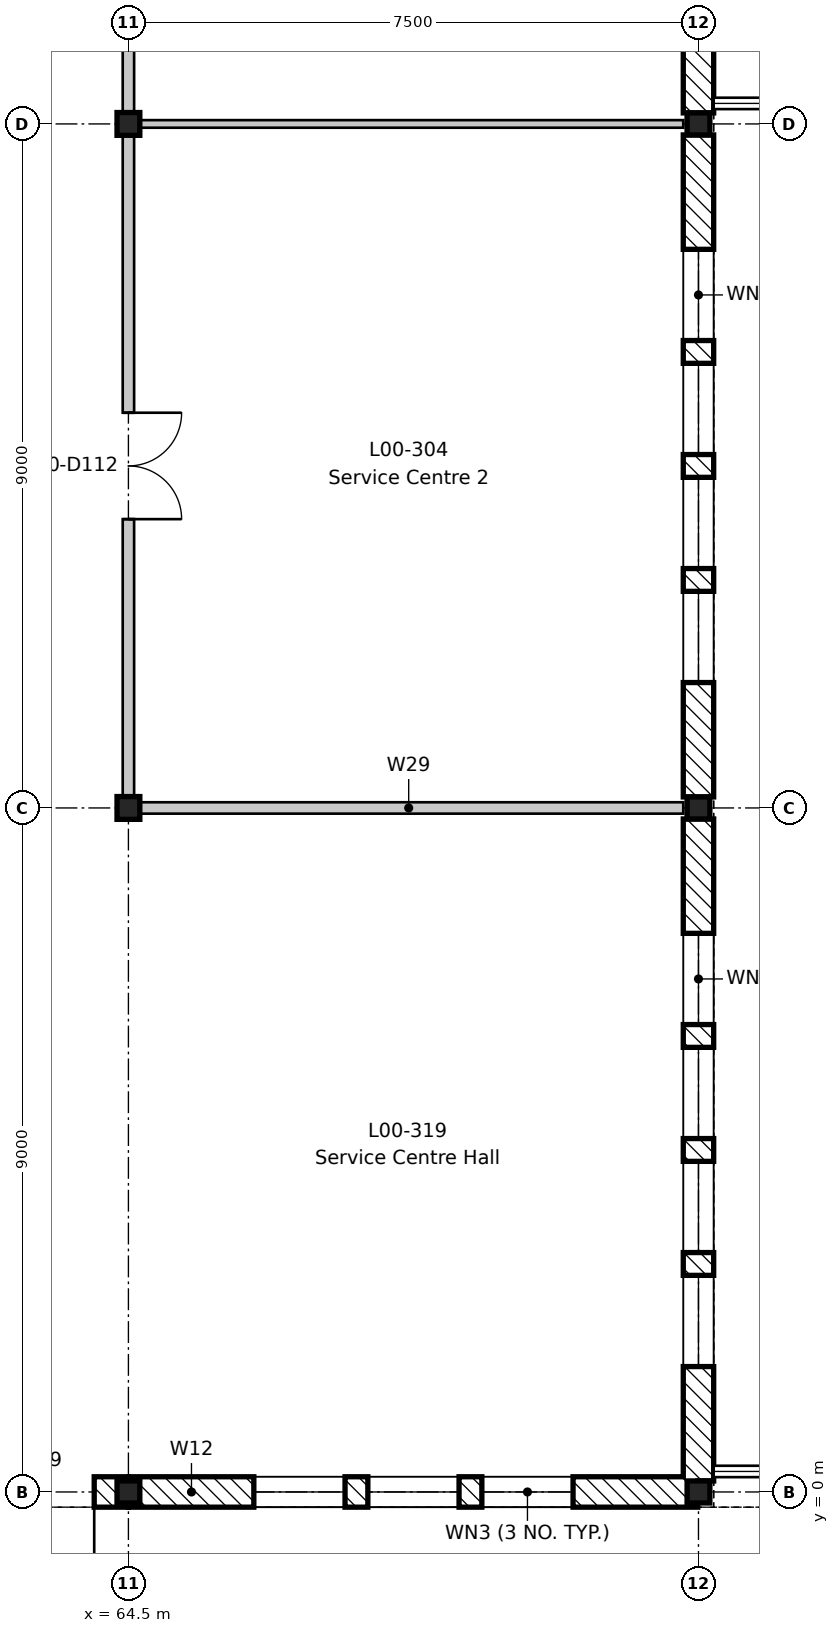
"""IFC4 building model, lengths in metres.
Left out: names, types, materials, properties, quantities, classifications, styles, units other than length and angle.
Written with IfcOpenShell. Run it as: python <this file> out.ifc"""

import sys

from ifc_helpers import new_model, si_unit, direction, frame, frame_2d, origin, origin_2d, place, context, subcontext, project, spatial, rectangle, i_section, extrude, element, fill, save


model = new_model("IFC4")
c1 = context("Model", 3, precision=1e-05, world=origin(), true_north=direction((0.0, 1.0)))
c2 = subcontext(c1, "Body", "Model", "MODEL_VIEW")
j1 = project(units=[si_unit("LENGTHUNIT", "METRE"), si_unit("PLANEANGLEUNIT", "RADIAN")], contexts=[c1])
p1 = place(None, origin())
s1 = spatial("IfcSite", under=j1, at=p1, CompositionType="ELEMENT")
p2 = place(p1, origin())
s2 = spatial("IfcBuilding", under=s1, at=p2, CompositionType="ELEMENT")
p3 = place(p2, origin())
s3 = spatial("IfcBuildingStorey", under=s2, at=p3, CompositionType="ELEMENT", Elevation=0.0)
p4 = place(p3, frame((64.5, 0.0, -0.6), z_axis=(0.0, 0.0, 1.0), x_axis=(1.0, 0.0, 0.0)))
e1 = element("IfcColumn", 1, at=p4, inside=s3, PredefinedType="COLUMN", context=c2, shape_type="SweptSolid", body=[
    extrude(i_section(OverallWidth=0.3, OverallDepth=0.29, WebThickness=0.009, FlangeThickness=0.014, FilletRadius=0.027, at=origin_2d()), origin(), (0.0, 0.0, 1.0), 5.8),
])
for number, where, z_axis, x_axis in (
    (2, (64.5, 9.0, -0.6), (0.0, 0.0, 1.0), (1.0, 0.0, 0.0)),
    (3, (64.5, 18.0, -0.6), (0.0, 0.0, 1.0), (1.0, 0.0, 0.0)),
):
    element("IfcColumn", number, at=place(p3, frame(where, z_axis=z_axis, x_axis=x_axis)), inside=s3, PredefinedType="COLUMN", context=c2, shape_type="SweptSolid", body=[
        extrude(i_section(OverallWidth=0.3, OverallDepth=0.3, WebThickness=0.011, FlangeThickness=0.019, FilletRadius=0.027, at=origin_2d()), origin(), (0.0, 0.0, 1.0), 5.8),
    ])
for number, where, z_axis, x_axis in (
    (4, (72.0, 0.0, -0.6), (0.0, 0.0, 1.0), (1.0, 0.0, 0.0)),
    (5, (72.0, 9.0, -0.6), (0.0, 0.0, 1.0), (1.0, 0.0, 0.0)),
    (6, (72.0, 18.0, -0.6), (0.0, 0.0, 1.0), (1.0, 0.0, 0.0)),
):
    element("IfcColumn", number, at=place(p3, frame(where, z_axis=z_axis, x_axis=x_axis)), inside=s3, PredefinedType="COLUMN", context=c2, shape_type="SweptSolid", body=[
        extrude(i_section(OverallWidth=0.3, OverallDepth=0.29, WebThickness=0.009, FlangeThickness=0.014, FilletRadius=0.027, at=origin_2d()), origin(), (0.0, 0.0, 1.0), 5.8),
    ])
p5 = place(p3, frame((72.0, 8.855, 0.0), z_axis=(0.0, 0.0, 1.0), x_axis=(0.0, -1.0, 0.0)))
e7 = element("IfcWall", 7, at=p5, inside=s3, PredefinedType="STANDARD", context=c2, shape_type="SweptSolid", body=[
    extrude(rectangle(XDim=8.71, YDim=0.4, at=frame_2d((4.355, 0.0))), origin(), (0.0, 0.0, 1.0), 4.8),
])
p6 = place(p5, frame((6.005, 0.0, 0.6)))
e8 = element("IfcOpeningElement", 8, at=p6, cuts=e7, PredefinedType="OPENING", context=c2, shape_type="SweptSolid", body=[
    extrude(rectangle(XDim=1.2, YDim=3.9, at=frame_2d((0.6, 1.95))), frame((0.0, 0.21, 0.0), z_axis=(0.0, -1.0, 0.0), x_axis=(1.0, 0.0, 0.0)), (0.0, 0.0, 1.0), 0.42),
])
p7 = place(p5, frame((4.505, 0.0, 0.6)))
e9 = element("IfcOpeningElement", 9, at=p7, cuts=e7, PredefinedType="OPENING", context=c2, shape_type="SweptSolid", body=[
    extrude(rectangle(XDim=1.2, YDim=3.9, at=frame_2d((0.6, 1.95))), frame((0.0, 0.21, 0.0), z_axis=(0.0, -1.0, 0.0), x_axis=(1.0, 0.0, 0.0)), (0.0, 0.0, 1.0), 0.42),
])
p8 = place(p5, frame((3.005, 0.0, 0.6)))
e10 = element("IfcOpeningElement", 10, at=p8, cuts=e7, PredefinedType="OPENING", context=c2, shape_type="SweptSolid", body=[
    extrude(rectangle(XDim=1.2, YDim=3.9, at=frame_2d((0.6, 1.95))), frame((0.0, 0.21, 0.0), z_axis=(0.0, -1.0, 0.0), x_axis=(1.0, 0.0, 0.0)), (0.0, 0.0, 1.0), 0.42),
])
p9 = place(p5, frame((1.505, 0.0, 0.6)))
e11 = element("IfcOpeningElement", 11, at=p9, cuts=e7, PredefinedType="OPENING", context=c2, shape_type="SweptSolid", body=[
    extrude(rectangle(XDim=1.2, YDim=3.9, at=frame_2d((0.6, 1.95))), frame((0.0, 0.21, 0.0), z_axis=(0.0, -1.0, 0.0), x_axis=(1.0, 0.0, 0.0)), (0.0, 0.0, 1.0), 0.42),
])
p10 = place(p3, frame((72.0, 17.855, 0.0), z_axis=(0.0, 0.0, 1.0), x_axis=(0.0, -1.0, 0.0)))
e12 = element("IfcWall", 12, at=p10, inside=s3, PredefinedType="STANDARD", context=c2, shape_type="SweptSolid", body=[
    extrude(rectangle(XDim=8.71, YDim=0.4, at=frame_2d((4.355, 0.0))), origin(), (0.0, 0.0, 1.0), 4.8),
])
p11 = place(p10, frame((6.005, 0.0, 0.6)))
e13 = element("IfcOpeningElement", 13, at=p11, cuts=e12, PredefinedType="OPENING", context=c2, shape_type="SweptSolid", body=[
    extrude(rectangle(XDim=1.2, YDim=3.9, at=frame_2d((0.6, 1.95))), frame((0.0, 0.21, 0.0), z_axis=(0.0, -1.0, 0.0), x_axis=(1.0, 0.0, 0.0)), (0.0, 0.0, 1.0), 0.42),
])
p12 = place(p10, frame((4.505, 0.0, 0.6)))
e14 = element("IfcOpeningElement", 14, at=p12, cuts=e12, PredefinedType="OPENING", context=c2, shape_type="SweptSolid", body=[
    extrude(rectangle(XDim=1.2, YDim=3.9, at=frame_2d((0.6, 1.95))), frame((0.0, 0.21, 0.0), z_axis=(0.0, -1.0, 0.0), x_axis=(1.0, 0.0, 0.0)), (0.0, 0.0, 1.0), 0.42),
])
p13 = place(p10, frame((3.005, 0.0, 0.6)))
e15 = element("IfcOpeningElement", 15, at=p13, cuts=e12, PredefinedType="OPENING", context=c2, shape_type="SweptSolid", body=[
    extrude(rectangle(XDim=1.2, YDim=3.9, at=frame_2d((0.6, 1.95))), frame((0.0, 0.21, 0.0), z_axis=(0.0, -1.0, 0.0), x_axis=(1.0, 0.0, 0.0)), (0.0, 0.0, 1.0), 0.42),
])
p14 = place(p10, frame((1.505, 0.0, 0.6)))
e16 = element("IfcOpeningElement", 16, at=p14, cuts=e12, PredefinedType="OPENING", context=c2, shape_type="SweptSolid", body=[
    extrude(rectangle(XDim=1.2, YDim=3.9, at=frame_2d((0.6, 1.95))), frame((0.0, 0.21, 0.0), z_axis=(0.0, -1.0, 0.0), x_axis=(1.0, 0.0, 0.0)), (0.0, 0.0, 1.0), 0.42),
])
p15 = place(p3, frame((72.0, 26.855, 0.0), z_axis=(0.0, 0.0, 1.0), x_axis=(0.0, -1.0, 0.0)))
e17 = element("IfcWall", 17, at=p15, inside=s3, PredefinedType="STANDARD", context=c2, shape_type="SweptSolid", body=[
    extrude(rectangle(XDim=8.71, YDim=0.4, at=frame_2d((4.355, 0.0))), origin(), (0.0, 0.0, 1.0), 4.8),
])
p16 = place(p15, frame((6.005, 0.0, 0.6)))
e18 = element("IfcOpeningElement", 18, at=p16, cuts=e17, PredefinedType="OPENING", context=c2, shape_type="SweptSolid", body=[
    extrude(rectangle(XDim=1.2, YDim=3.9, at=frame_2d((0.6, 1.95))), frame((0.0, 0.21, 0.0), z_axis=(0.0, -1.0, 0.0), x_axis=(1.0, 0.0, 0.0)), (0.0, 0.0, 1.0), 0.42),
])
p17 = place(p15, frame((4.505, 0.0, 0.6)))
e19 = element("IfcOpeningElement", 19, at=p17, cuts=e17, PredefinedType="OPENING", context=c2, shape_type="SweptSolid", body=[
    extrude(rectangle(XDim=1.2, YDim=3.9, at=frame_2d((0.6, 1.95))), frame((0.0, 0.21, 0.0), z_axis=(0.0, -1.0, 0.0), x_axis=(1.0, 0.0, 0.0)), (0.0, 0.0, 1.0), 0.42),
])
p18 = place(p15, frame((3.005, 0.0, 0.6)))
e20 = element("IfcOpeningElement", 20, at=p18, cuts=e17, PredefinedType="OPENING", context=c2, shape_type="SweptSolid", body=[
    extrude(rectangle(XDim=1.2, YDim=3.9, at=frame_2d((0.6, 1.95))), frame((0.0, 0.21, 0.0), z_axis=(0.0, -1.0, 0.0), x_axis=(1.0, 0.0, 0.0)), (0.0, 0.0, 1.0), 0.42),
])
p19 = place(p15, frame((1.505, 0.0, 0.6)))
e21 = element("IfcOpeningElement", 21, at=p19, cuts=e17, PredefinedType="OPENING", context=c2, shape_type="SweptSolid", body=[
    extrude(rectangle(XDim=1.2, YDim=3.9, at=frame_2d((0.6, 1.95))), frame((0.0, 0.21, 0.0), z_axis=(0.0, -1.0, 0.0), x_axis=(1.0, 0.0, 0.0)), (0.0, 0.0, 1.0), 0.42),
])
p20 = place(p3, frame((64.491, 0.0, 0.0), z_axis=(0.0, 0.0, 1.0), x_axis=(-1.0, 0.0, 0.0)))
e22 = element("IfcWall", 22, at=p20, inside=s3, PredefinedType="STANDARD", context=c2, shape_type="SweptSolid", body=[
    extrude(rectangle(XDim=2.981, YDim=0.4, at=frame_2d((1.491, 0.0))), origin(), (0.0, 0.0, 1.0), 5.0),
])
p21 = place(p20, frame((0.441, 0.0, 0.0)))
e23 = element("IfcOpeningElement", 23, at=p21, cuts=e22, PredefinedType="OPENING", context=c2, shape_type="SweptSolid", body=[
    extrude(rectangle(XDim=2.1, YDim=2.4, at=frame_2d((1.05, 1.2))), frame((0.0, 0.21, 0.0), z_axis=(0.0, -1.0, 0.0), x_axis=(1.0, 0.0, 0.0)), (0.0, 0.0, 1.0), 0.42),
])
p22 = place(p3, frame((71.991, 0.0, 0.0), z_axis=(0.0, 0.0, 1.0), x_axis=(-1.0, 0.0, 0.0)))
e24 = element("IfcWall", 24, at=p22, inside=s3, PredefinedType="STANDARD", context=c2, shape_type="SweptSolid", body=[
    extrude(rectangle(XDim=7.481, YDim=0.4, at=frame_2d((3.741, 0.0))), origin(), (0.0, 0.0, 1.0), 4.87),
])
p23 = place(p22, frame((4.641, 0.0, 0.6)))
e25 = element("IfcOpeningElement", 25, at=p23, cuts=e24, PredefinedType="OPENING", context=c2, shape_type="SweptSolid", body=[
    extrude(rectangle(XDim=1.2, YDim=3.9, at=frame_2d((0.6, 1.95))), frame((0.0, 0.21, 0.0), z_axis=(0.0, -1.0, 0.0), x_axis=(1.0, 0.0, 0.0)), (0.0, 0.0, 1.0), 0.42),
])
p24 = place(p22, frame((3.141, 0.0, 0.6)))
e26 = element("IfcOpeningElement", 26, at=p24, cuts=e24, PredefinedType="OPENING", context=c2, shape_type="SweptSolid", body=[
    extrude(rectangle(XDim=1.2, YDim=3.9, at=frame_2d((0.6, 1.95))), frame((0.0, 0.21, 0.0), z_axis=(0.0, -1.0, 0.0), x_axis=(1.0, 0.0, 0.0)), (0.0, 0.0, 1.0), 0.42),
])
p25 = place(p22, frame((1.641, 0.0, 0.6)))
e27 = element("IfcOpeningElement", 27, at=p25, cuts=e24, PredefinedType="OPENING", context=c2, shape_type="SweptSolid", body=[
    extrude(rectangle(XDim=1.2, YDim=3.9, at=frame_2d((0.6, 1.95))), frame((0.0, 0.21, 0.0), z_axis=(0.0, -1.0, 0.0), x_axis=(1.0, 0.0, 0.0)), (0.0, 0.0, 1.0), 0.42),
])
p26 = place(p3, frame((64.575, 9.0, 0.0), z_axis=(0.0, 0.0, 1.0), x_axis=(1.0, 0.0, 0.0)))
e28 = element("IfcWall", 28, at=p26, inside=s3, PredefinedType="PARTITIONING", context=c2, shape_type="SweptSolid", body=[
    extrude(rectangle(XDim=7.225, YDim=0.15, at=frame_2d((3.613, 0.0))), origin(), (0.0, 0.0, 1.0), 4.85),
])
p27 = place(p3, frame((64.575, 18.0, 0.0), z_axis=(0.0, 0.0, 1.0), x_axis=(1.0, 0.0, 0.0)))
e29 = element("IfcWall", 29, at=p27, inside=s3, PredefinedType="PARTITIONING", context=c2, shape_type="SweptSolid", body=[
    extrude(rectangle(XDim=7.225, YDim=0.1, at=frame_2d((3.613, 0.0))), origin(), (0.0, 0.0, 1.0), 4.85),
])
p28 = place(p3, frame((64.5, 9.0, 0.0), z_axis=(0.0, 0.0, 1.0), x_axis=(0.0, 1.0, 0.0)))
e30 = element("IfcWall", 30, at=p28, inside=s3, PredefinedType="PARTITIONING", context=c2, shape_type="SweptSolid", body=[
    extrude(rectangle(XDim=44.8, YDim=0.15, at=frame_2d((22.4, 0.0))), origin(), (0.0, 0.0, 1.0), 4.68),
])
p29 = place(p28, frame((3.8, 0.0, 0.0)))
e31 = element("IfcOpeningElement", 31, at=p29, cuts=e30, PredefinedType="OPENING", context=c2, shape_type="SweptSolid", body=[
    extrude(rectangle(XDim=1.4, YDim=2.1, at=frame_2d((0.7, 1.05))), frame((0.0, 0.085, 0.0), z_axis=(0.0, -1.0, 0.0), x_axis=(1.0, 0.0, 0.0)), (0.0, 0.0, 1.0), 0.17),
])
p30 = place(p28, frame((12.8, 0.0, 0.0)))
e32 = element("IfcOpeningElement", 32, at=p30, cuts=e30, PredefinedType="OPENING", context=c2, shape_type="SweptSolid", body=[
    extrude(rectangle(XDim=1.4, YDim=2.1, at=frame_2d((0.7, 1.05))), frame((0.0, 0.085, 0.0), z_axis=(0.0, -1.0, 0.0), x_axis=(1.0, 0.0, 0.0)), (0.0, 0.0, 1.0), 0.17),
])
p31 = place(p28, frame((21.8, 0.0, 0.0)))
e33 = element("IfcOpeningElement", 33, at=p31, cuts=e30, PredefinedType="OPENING", context=c2, shape_type="SweptSolid", body=[
    extrude(rectangle(XDim=1.4, YDim=2.1, at=frame_2d((0.7, 1.05))), frame((0.0, 0.085, 0.0), z_axis=(0.0, -1.0, 0.0), x_axis=(1.0, 0.0, 0.0)), (0.0, 0.0, 1.0), 0.17),
])
p32 = place(p28, frame((30.8, 0.0, 0.0)))
e34 = element("IfcOpeningElement", 34, at=p32, cuts=e30, PredefinedType="OPENING", context=c2, shape_type="SweptSolid", body=[
    extrude(rectangle(XDim=1.4, YDim=2.1, at=frame_2d((0.7, 1.05))), frame((0.0, 0.085, 0.0), z_axis=(0.0, -1.0, 0.0), x_axis=(1.0, 0.0, 0.0)), (0.0, 0.0, 1.0), 0.17),
])
p33 = place(p28, frame((39.8, 0.0, 0.0)))
e35 = element("IfcOpeningElement", 35, at=p33, cuts=e30, PredefinedType="OPENING", context=c2, shape_type="SweptSolid", body=[
    extrude(rectangle(XDim=1.4, YDim=2.1, at=frame_2d((0.7, 1.05))), frame((0.0, 0.085, 0.0), z_axis=(0.0, -1.0, 0.0), x_axis=(1.0, 0.0, 0.0)), (0.0, 0.0, 1.0), 0.17),
])
p34 = place(p6, origin())
e36 = element("IfcWindow", 36, at=p34, inside=s3, PartitioningType="SINGLE_PANEL", PredefinedType="WINDOW", context=c2, shape_type="SweptSolid", body=[
    extrude(rectangle(XDim=1.2, YDim=3.9, at=frame_2d((0.6, 1.95))), frame((0.0, 0.03, 0.0), z_axis=(0.0, -1.0, 0.0), x_axis=(1.0, 0.0, 0.0)), (0.0, 0.0, 1.0), 0.06),
])
fill(e8, e36)
p35 = place(p7, origin())
e37 = element("IfcWindow", 37, at=p35, inside=s3, PartitioningType="SINGLE_PANEL", PredefinedType="WINDOW", context=c2, shape_type="SweptSolid", body=[
    extrude(rectangle(XDim=1.2, YDim=3.9, at=frame_2d((0.6, 1.95))), frame((0.0, 0.03, 0.0), z_axis=(0.0, -1.0, 0.0), x_axis=(1.0, 0.0, 0.0)), (0.0, 0.0, 1.0), 0.06),
])
fill(e9, e37)
p36 = place(p8, origin())
e38 = element("IfcWindow", 38, at=p36, inside=s3, PartitioningType="SINGLE_PANEL", PredefinedType="WINDOW", context=c2, shape_type="SweptSolid", body=[
    extrude(rectangle(XDim=1.2, YDim=3.9, at=frame_2d((0.6, 1.95))), frame((0.0, 0.03, 0.0), z_axis=(0.0, -1.0, 0.0), x_axis=(1.0, 0.0, 0.0)), (0.0, 0.0, 1.0), 0.06),
])
fill(e10, e38)
p37 = place(p9, origin())
e39 = element("IfcWindow", 39, at=p37, inside=s3, PartitioningType="SINGLE_PANEL", PredefinedType="WINDOW", context=c2, shape_type="SweptSolid", body=[
    extrude(rectangle(XDim=1.2, YDim=3.9, at=frame_2d((0.6, 1.95))), frame((0.0, 0.03, 0.0), z_axis=(0.0, -1.0, 0.0), x_axis=(1.0, 0.0, 0.0)), (0.0, 0.0, 1.0), 0.06),
])
fill(e11, e39)
p38 = place(p11, origin())
e40 = element("IfcWindow", 40, at=p38, inside=s3, PartitioningType="SINGLE_PANEL", PredefinedType="WINDOW", context=c2, shape_type="SweptSolid", body=[
    extrude(rectangle(XDim=1.2, YDim=3.9, at=frame_2d((0.6, 1.95))), frame((0.0, 0.03, 0.0), z_axis=(0.0, -1.0, 0.0), x_axis=(1.0, 0.0, 0.0)), (0.0, 0.0, 1.0), 0.06),
])
fill(e13, e40)
p39 = place(p12, origin())
e41 = element("IfcWindow", 41, at=p39, inside=s3, PartitioningType="SINGLE_PANEL", PredefinedType="WINDOW", context=c2, shape_type="SweptSolid", body=[
    extrude(rectangle(XDim=1.2, YDim=3.9, at=frame_2d((0.6, 1.95))), frame((0.0, 0.03, 0.0), z_axis=(0.0, -1.0, 0.0), x_axis=(1.0, 0.0, 0.0)), (0.0, 0.0, 1.0), 0.06),
])
fill(e14, e41)
p40 = place(p13, origin())
e42 = element("IfcWindow", 42, at=p40, inside=s3, PartitioningType="SINGLE_PANEL", PredefinedType="WINDOW", context=c2, shape_type="SweptSolid", body=[
    extrude(rectangle(XDim=1.2, YDim=3.9, at=frame_2d((0.6, 1.95))), frame((0.0, 0.03, 0.0), z_axis=(0.0, -1.0, 0.0), x_axis=(1.0, 0.0, 0.0)), (0.0, 0.0, 1.0), 0.06),
])
fill(e15, e42)
p41 = place(p14, origin())
e43 = element("IfcWindow", 43, at=p41, inside=s3, PartitioningType="SINGLE_PANEL", PredefinedType="WINDOW", context=c2, shape_type="SweptSolid", body=[
    extrude(rectangle(XDim=1.2, YDim=3.9, at=frame_2d((0.6, 1.95))), frame((0.0, 0.03, 0.0), z_axis=(0.0, -1.0, 0.0), x_axis=(1.0, 0.0, 0.0)), (0.0, 0.0, 1.0), 0.06),
])
fill(e16, e43)
p42 = place(p21, origin())
e44 = element("IfcDoor", 44, at=p42, inside=s3, OperationType="DOUBLE_DOOR_SINGLE_SWING", PredefinedType="DOOR", context=c2, shape_type="SweptSolid", body=[
    extrude(rectangle(XDim=2.1, YDim=2.4, at=frame_2d((1.05, 1.2))), frame((0.0, 0.025, 0.0), z_axis=(0.0, -1.0, 0.0), x_axis=(1.0, 0.0, 0.0)), (0.0, 0.0, 1.0), 0.05),
])
fill(e23, e44)
p43 = place(p23, origin())
e45 = element("IfcWindow", 45, at=p43, inside=s3, PartitioningType="SINGLE_PANEL", PredefinedType="WINDOW", context=c2, shape_type="SweptSolid", body=[
    extrude(rectangle(XDim=1.2, YDim=3.9, at=frame_2d((0.6, 1.95))), frame((0.0, 0.03, 0.0), z_axis=(0.0, -1.0, 0.0), x_axis=(1.0, 0.0, 0.0)), (0.0, 0.0, 1.0), 0.06),
])
fill(e25, e45)
p44 = place(p24, origin())
e46 = element("IfcWindow", 46, at=p44, inside=s3, PartitioningType="SINGLE_PANEL", PredefinedType="WINDOW", context=c2, shape_type="SweptSolid", body=[
    extrude(rectangle(XDim=1.2, YDim=3.9, at=frame_2d((0.6, 1.95))), frame((0.0, 0.03, 0.0), z_axis=(0.0, -1.0, 0.0), x_axis=(1.0, 0.0, 0.0)), (0.0, 0.0, 1.0), 0.06),
])
fill(e26, e46)
p45 = place(p25, origin())
e47 = element("IfcWindow", 47, at=p45, inside=s3, PartitioningType="SINGLE_PANEL", PredefinedType="WINDOW", context=c2, shape_type="SweptSolid", body=[
    extrude(rectangle(XDim=1.2, YDim=3.9, at=frame_2d((0.6, 1.95))), frame((0.0, 0.03, 0.0), z_axis=(0.0, -1.0, 0.0), x_axis=(1.0, 0.0, 0.0)), (0.0, 0.0, 1.0), 0.06),
])
fill(e27, e47)
p46 = place(p29, frame((1.4, 0.0, 0.0), z_axis=(0.0, 0.0, 1.0), x_axis=(-1.0, 0.0, 0.0)))
e48 = element("IfcDoor", 48, at=p46, inside=s3, OperationType="DOUBLE_DOOR_SINGLE_SWING", PredefinedType="DOOR", context=c2, shape_type="SweptSolid", body=[
    extrude(rectangle(XDim=1.4, YDim=2.1, at=frame_2d((0.7, 1.05))), frame((0.0, 0.025, 0.0), z_axis=(0.0, -1.0, 0.0), x_axis=(1.0, 0.0, 0.0)), (0.0, 0.0, 1.0), 0.05),
])
fill(e31, e48)
save(model, sys.argv[1])
